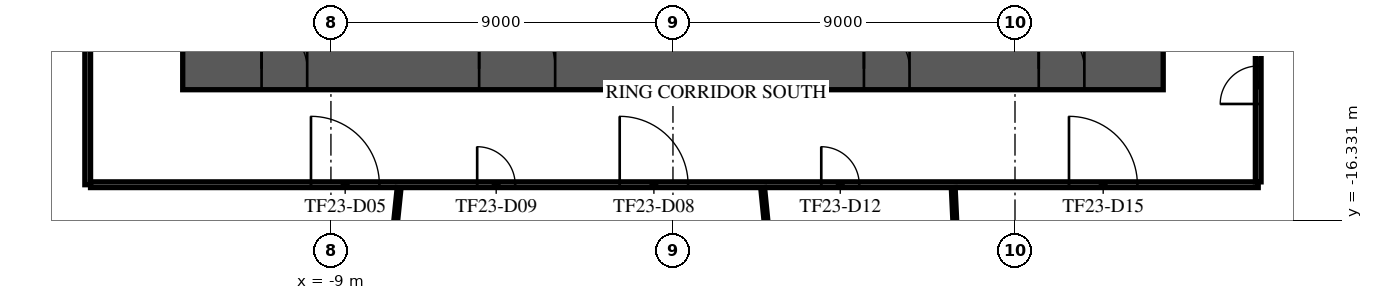
"""IFC4 building model, lengths in metres.
Left out: names, types, materials, properties, quantities, classifications, styles, units other than length and angle.
Written with IfcOpenShell. Run it as: python <this file> out.ifc"""

import sys

from ifc_helpers import new_model, si_unit, direction, frame, frame_2d, origin, place, context, subcontext, project, spatial, rectangle, extrude, element, fill, save


model = new_model("IFC4")
c1 = context("Model", 3, precision=1e-05, world=origin(), true_north=direction((0.0, 1.0)))
c2 = subcontext(c1, "Body", "Model", "MODEL_VIEW")
j1 = project(units=[si_unit("LENGTHUNIT", "METRE"), si_unit("PLANEANGLEUNIT", "RADIAN")], contexts=[c1])
p1 = place(None, origin())
s1 = spatial("IfcSite", under=j1, at=p1, CompositionType="ELEMENT")
p2 = place(p1, origin())
s2 = spatial("IfcBuilding", under=s1, at=p2, CompositionType="ELEMENT")
p3 = place(p2, frame((0.0, 0.0, 102.1)))
s3 = spatial("IfcBuildingStorey", under=s2, at=p3, CompositionType="ELEMENT", Elevation=102.1)
p4 = place(p3, frame((-12.9, -12.35, 0.0), z_axis=(0.0, 0.0, 1.0), x_axis=(1.0, 0.0, 0.0)))
e1 = element("IfcWall", 1, at=p4, inside=s3, PredefinedType="SHEAR", context=c2, shape_type="SweptSolid", body=[
    extrude(rectangle(XDim=25.8, YDim=1.1, at=frame_2d((12.9, 0.0))), origin(), (0.0, 0.0, 1.0), 3.58),
])
p5 = place(p4, frame((7.8, 0.0, 0.0)))
e2 = element("IfcOpeningElement", 2, at=p5, cuts=e1, PredefinedType="OPENING", context=c2, shape_type="SweptSolid", body=[
    extrude(rectangle(XDim=2.0, YDim=2.1, at=frame_2d((1.0, 1.05))), frame((0.0, 0.56, 0.0), z_axis=(0.0, -1.0, 0.0), x_axis=(1.0, 0.0, 0.0)), (0.0, 0.0, 1.0), 1.12),
])
p6 = place(p4, frame((17.925, 0.0, 0.0)))
e3 = element("IfcOpeningElement", 3, at=p6, cuts=e1, PredefinedType="OPENING", context=c2, shape_type="SweptSolid", body=[
    extrude(rectangle(XDim=1.2, YDim=2.1, at=frame_2d((0.6, 1.05))), frame((0.0, 0.56, 0.0), z_axis=(0.0, -1.0, 0.0), x_axis=(1.0, 0.0, 0.0)), (0.0, 0.0, 1.0), 1.12),
])
p7 = place(p4, frame((2.075, 0.0, 0.0)))
e4 = element("IfcOpeningElement", 4, at=p7, cuts=e1, PredefinedType="OPENING", context=c2, shape_type="SweptSolid", body=[
    extrude(rectangle(XDim=1.2, YDim=2.1, at=frame_2d((0.6, 1.05))), frame((0.0, 0.56, 0.0), z_axis=(0.0, -1.0, 0.0), x_axis=(1.0, 0.0, 0.0)), (0.0, 0.0, 1.0), 1.12),
])
p8 = place(p4, frame((22.525, 0.0, 0.0)))
e5 = element("IfcOpeningElement", 5, at=p8, cuts=e1, PredefinedType="OPENING", context=c2, shape_type="SweptSolid", body=[
    extrude(rectangle(XDim=1.2, YDim=2.1, at=frame_2d((0.6, 1.05))), frame((0.0, 0.56, 0.0), z_axis=(0.0, -1.0, 0.0), x_axis=(1.0, 0.0, 0.0)), (0.0, 0.0, 1.0), 1.12),
])
p9 = place(p3, frame((-15.4, -15.4, 0.0), z_axis=(0.0, 0.0, 1.0), x_axis=(0.0, 1.0, 0.0)))
e6 = element("IfcWall", 6, at=p9, inside=s3, PredefinedType="PARTITIONING", context=c2, shape_type="SweptSolid", body=[
    extrude(rectangle(XDim=30.8, YDim=0.15, at=frame_2d((15.4, 0.0))), origin(), (0.0, 0.0, 1.0), 3.08),
])
p10 = place(p9, frame((21.999, 0.0, 0.0)))
e7 = element("IfcOpeningElement", 7, at=p10, cuts=e6, PredefinedType="OPENING", context=c2, shape_type="SweptSolid", body=[
    extrude(rectangle(XDim=1.0, YDim=2.1, at=frame_2d((0.5, 1.05))), frame((0.0, 0.085, 0.0), z_axis=(0.0, -1.0, 0.0), x_axis=(1.0, 0.0, 0.0)), (0.0, 0.0, 1.0), 0.17),
])
p11 = place(p9, frame((11.518, 0.0, 0.0)))
e8 = element("IfcOpeningElement", 8, at=p11, cuts=e6, PredefinedType="OPENING", context=c2, shape_type="SweptSolid", body=[
    extrude(rectangle(XDim=1.0, YDim=2.1, at=frame_2d((0.5, 1.05))), frame((0.0, 0.085, 0.0), z_axis=(0.0, -1.0, 0.0), x_axis=(1.0, 0.0, 0.0)), (0.0, 0.0, 1.0), 0.17),
])
p12 = place(p9, frame((26.005, 0.0, 0.0)))
e9 = element("IfcOpeningElement", 9, at=p12, cuts=e6, PredefinedType="OPENING", context=c2, shape_type="SweptSolid", body=[
    extrude(rectangle(XDim=1.8, YDim=2.1, at=frame_2d((0.9, 1.05))), frame((0.0, 0.085, 0.0), z_axis=(0.0, -1.0, 0.0), x_axis=(1.0, 0.0, 0.0)), (0.0, 0.0, 1.0), 0.17),
])
p13 = place(p9, frame((6.3, 0.0, 0.0)))
e10 = element("IfcOpeningElement", 10, at=p13, cuts=e6, PredefinedType="OPENING", context=c2, shape_type="SweptSolid", body=[
    extrude(rectangle(XDim=1.0, YDim=2.1, at=frame_2d((0.5, 1.05))), frame((0.0, 0.085, 0.0), z_axis=(0.0, -1.0, 0.0), x_axis=(1.0, 0.0, 0.0)), (0.0, 0.0, 1.0), 0.17),
])
p14 = place(p3, frame((-15.325, -15.4, 0.0), z_axis=(0.0, 0.0, 1.0), x_axis=(1.0, 0.0, 0.0)))
e11 = element("IfcWall", 11, at=p14, inside=s3, PredefinedType="PARTITIONING", context=c2, shape_type="SweptSolid", body=[
    extrude(rectangle(XDim=30.725, YDim=0.15, at=frame_2d((15.362, 0.0))), origin(), (0.0, 0.0, 1.0), 3.08),
])
p15 = place(p14, frame((5.8, 0.0, 0.0)))
e12 = element("IfcOpeningElement", 12, at=p15, cuts=e11, PredefinedType="OPENING", context=c2, shape_type="SweptSolid", body=[
    extrude(rectangle(XDim=1.8, YDim=2.1, at=frame_2d((0.9, 1.05))), frame((0.0, 0.085, 0.0), z_axis=(0.0, -1.0, 0.0), x_axis=(1.0, 0.0, 0.0)), (0.0, 0.0, 1.0), 0.17),
])
p16 = place(p14, frame((13.923, 0.0, 0.0)))
e13 = element("IfcOpeningElement", 13, at=p16, cuts=e11, PredefinedType="OPENING", context=c2, shape_type="SweptSolid", body=[
    extrude(rectangle(XDim=1.8, YDim=2.1, at=frame_2d((0.9, 1.05))), frame((0.0, 0.085, 0.0), z_axis=(0.0, -1.0, 0.0), x_axis=(1.0, 0.0, 0.0)), (0.0, 0.0, 1.0), 0.17),
])
p17 = place(p14, frame((10.173, 0.0, 0.0)))
e14 = element("IfcOpeningElement", 14, at=p17, cuts=e11, PredefinedType="OPENING", context=c2, shape_type="SweptSolid", body=[
    extrude(rectangle(XDim=1.0, YDim=2.1, at=frame_2d((0.5, 1.05))), frame((0.0, 0.085, 0.0), z_axis=(0.0, -1.0, 0.0), x_axis=(1.0, 0.0, 0.0)), (0.0, 0.0, 1.0), 0.17),
])
p18 = place(p14, frame((19.227, 0.0, 0.0)))
e15 = element("IfcOpeningElement", 15, at=p18, cuts=e11, PredefinedType="OPENING", context=c2, shape_type="SweptSolid", body=[
    extrude(rectangle(XDim=1.0, YDim=2.1, at=frame_2d((0.5, 1.05))), frame((0.0, 0.085, 0.0), z_axis=(0.0, -1.0, 0.0), x_axis=(1.0, 0.0, 0.0)), (0.0, 0.0, 1.0), 0.17),
])
p19 = place(p14, frame((25.746, 0.0, 0.0)))
e16 = element("IfcOpeningElement", 16, at=p19, cuts=e11, PredefinedType="OPENING", context=c2, shape_type="SweptSolid", body=[
    extrude(rectangle(XDim=1.8, YDim=2.1, at=frame_2d((0.9, 1.05))), frame((0.0, 0.085, 0.0), z_axis=(0.0, -1.0, 0.0), x_axis=(1.0, 0.0, 0.0)), (0.0, 0.0, 1.0), 0.17),
])
p20 = place(p3, frame((15.4, -15.325, 0.0), z_axis=(0.0, 0.0, 1.0), x_axis=(0.0, 1.0, 0.0)))
e17 = element("IfcWall", 17, at=p20, inside=s3, PredefinedType="PARTITIONING", context=c2, shape_type="SweptSolid", body=[
    extrude(rectangle(XDim=30.65, YDim=0.15, at=frame_2d((15.325, 0.0))), origin(), (0.0, 0.0, 1.0), 3.08),
])
p21 = place(p20, frame((23.606, 0.0, 0.0)))
e18 = element("IfcOpeningElement", 18, at=p21, cuts=e17, PredefinedType="OPENING", context=c2, shape_type="SweptSolid", body=[
    extrude(rectangle(XDim=1.8, YDim=2.1, at=frame_2d((0.9, 1.05))), frame((0.0, 0.085, 0.0), z_axis=(0.0, -1.0, 0.0), x_axis=(1.0, 0.0, 0.0)), (0.0, 0.0, 1.0), 0.17),
])
p22 = place(p20, frame((2.05, 0.0, 0.0)))
e19 = element("IfcOpeningElement", 19, at=p22, cuts=e17, PredefinedType="OPENING", context=c2, shape_type="SweptSolid", body=[
    extrude(rectangle(XDim=1.0, YDim=2.1, at=frame_2d((0.5, 1.05))), frame((0.0, 0.085, 0.0), z_axis=(0.0, -1.0, 0.0), x_axis=(1.0, 0.0, 0.0)), (0.0, 0.0, 1.0), 0.17),
])
p23 = place(p20, frame((13.822, 0.0, 0.0)))
e20 = element("IfcOpeningElement", 20, at=p23, cuts=e17, PredefinedType="OPENING", context=c2, shape_type="SweptSolid", body=[
    extrude(rectangle(XDim=1.0, YDim=2.1, at=frame_2d((0.5, 1.05))), frame((0.0, 0.085, 0.0), z_axis=(0.0, -1.0, 0.0), x_axis=(1.0, 0.0, 0.0)), (0.0, 0.0, 1.0), 0.17),
])
p24 = place(p20, frame((7.306, 0.0, 0.0)))
e21 = element("IfcOpeningElement", 21, at=p24, cuts=e17, PredefinedType="OPENING", context=c2, shape_type="SweptSolid", body=[
    extrude(rectangle(XDim=1.0, YDim=2.1, at=frame_2d((0.5, 1.05))), frame((0.0, 0.085, 0.0), z_axis=(0.0, -1.0, 0.0), x_axis=(1.0, 0.0, 0.0)), (0.0, 0.0, 1.0), 0.17),
])
p25 = place(p3, frame((-8.993, -32.799, 0.0), z_axis=(0.0, 0.0, 1.0), x_axis=(0.102654687672, 0.994717052784, 0.0)))
e22 = element("IfcWall", 22, at=p25, inside=s3, PredefinedType="PARTITIONING", context=c2, shape_type="SweptSolid", body=[
    extrude(rectangle(XDim=17.411, YDim=0.1, at=frame_2d((8.706, 0.0))), origin(), (0.0, 0.0, 1.0), 2.83),
])
p26 = place(p3, frame((2.36, -15.48, 0.0), z_axis=(0.0, 0.0, 1.0), x_axis=(0.099470960922, -0.995040465475, 0.0)))
e23 = element("IfcWall", 23, at=p26, inside=s3, PredefinedType="PARTITIONING", context=c2, shape_type="SweptSolid", body=[
    extrude(rectangle(XDim=12.544, YDim=0.1, at=frame_2d((6.272, 0.0))), origin(), (0.0, 0.0, 1.0), 2.83),
])
p27 = place(p3, frame((7.375, -15.477, 0.0), z_axis=(0.0, 0.0, 1.0), x_axis=(0.046868466971, -0.998901069578, 0.0)))
e24 = element("IfcWall", 24, at=p27, inside=s3, PredefinedType="PARTITIONING", context=c2, shape_type="SweptSolid", body=[
    extrude(rectangle(XDim=10.856, YDim=0.1, at=frame_2d((5.428, 0.0))), origin(), (0.0, 0.0, 1.0), 2.83),
])
p28 = place(p5, origin())
e25 = element("IfcDoor", 25, at=p28, inside=s3, OperationType="SINGLE_SWING_LEFT", PredefinedType="DOOR", context=c2, shape_type="SweptSolid", body=[
    extrude(rectangle(XDim=2.0, YDim=2.1, at=frame_2d((1.0, 1.05))), frame((0.0, 0.025, 0.0), z_axis=(0.0, -1.0, 0.0), x_axis=(1.0, 0.0, 0.0)), (0.0, 0.0, 1.0), 0.05),
])
fill(e2, e25)
p29 = place(p6, origin())
e26 = element("IfcDoor", 26, at=p29, inside=s3, OperationType="SINGLE_SWING_LEFT", PredefinedType="DOOR", context=c2, shape_type="SweptSolid", body=[
    extrude(rectangle(XDim=1.2, YDim=2.1, at=frame_2d((0.6, 1.05))), frame((0.0, 0.025, 0.0), z_axis=(0.0, -1.0, 0.0), x_axis=(1.0, 0.0, 0.0)), (0.0, 0.0, 1.0), 0.05),
])
fill(e3, e26)
p30 = place(p7, origin())
e27 = element("IfcDoor", 27, at=p30, inside=s3, OperationType="SINGLE_SWING_LEFT", PredefinedType="DOOR", context=c2, shape_type="SweptSolid", body=[
    extrude(rectangle(XDim=1.2, YDim=2.1, at=frame_2d((0.6, 1.05))), frame((0.0, 0.025, 0.0), z_axis=(0.0, -1.0, 0.0), x_axis=(1.0, 0.0, 0.0)), (0.0, 0.0, 1.0), 0.05),
])
fill(e4, e27)
p31 = place(p8, origin())
e28 = element("IfcDoor", 28, at=p31, inside=s3, OperationType="SINGLE_SWING_LEFT", PredefinedType="DOOR", context=c2, shape_type="SweptSolid", body=[
    extrude(rectangle(XDim=1.2, YDim=2.1, at=frame_2d((0.6, 1.05))), frame((0.0, 0.025, 0.0), z_axis=(0.0, -1.0, 0.0), x_axis=(1.0, 0.0, 0.0)), (0.0, 0.0, 1.0), 0.05),
])
fill(e5, e28)
p32 = place(p15, frame((1.8, 0.0, 0.0), z_axis=(0.0, 0.0, 1.0), x_axis=(-1.0, 0.0, 0.0)))
e29 = element("IfcDoor", 29, at=p32, inside=s3, OperationType="DOUBLE_DOOR_SINGLE_SWING", PredefinedType="DOOR", context=c2, shape_type="SweptSolid", body=[
    extrude(rectangle(XDim=1.8, YDim=2.1, at=frame_2d((0.9, 1.05))), frame((0.0, 0.025, 0.0), z_axis=(0.0, -1.0, 0.0), x_axis=(1.0, 0.0, 0.0)), (0.0, 0.0, 1.0), 0.05),
])
fill(e12, e29)
p33 = place(p16, frame((1.8, 0.0, 0.0), z_axis=(0.0, 0.0, 1.0), x_axis=(-1.0, 0.0, 0.0)))
e30 = element("IfcDoor", 30, at=p33, inside=s3, OperationType="DOUBLE_DOOR_SINGLE_SWING", PredefinedType="DOOR", context=c2, shape_type="SweptSolid", body=[
    extrude(rectangle(XDim=1.8, YDim=2.1, at=frame_2d((0.9, 1.05))), frame((0.0, 0.025, 0.0), z_axis=(0.0, -1.0, 0.0), x_axis=(1.0, 0.0, 0.0)), (0.0, 0.0, 1.0), 0.05),
])
fill(e13, e30)
p34 = place(p17, frame((1.0, 0.0, 0.0), z_axis=(0.0, 0.0, 1.0), x_axis=(-1.0, 0.0, 0.0)))
e31 = element("IfcDoor", 31, at=p34, inside=s3, OperationType="SINGLE_SWING_RIGHT", PredefinedType="DOOR", context=c2, shape_type="SweptSolid", body=[
    extrude(rectangle(XDim=1.0, YDim=2.1, at=frame_2d((0.5, 1.05))), frame((0.0, 0.025, 0.0), z_axis=(0.0, -1.0, 0.0), x_axis=(1.0, 0.0, 0.0)), (0.0, 0.0, 1.0), 0.05),
])
fill(e14, e31)
p35 = place(p18, frame((1.0, 0.0, 0.0), z_axis=(0.0, 0.0, 1.0), x_axis=(-1.0, 0.0, 0.0)))
e32 = element("IfcDoor", 32, at=p35, inside=s3, OperationType="SINGLE_SWING_LEFT", PredefinedType="DOOR", context=c2, shape_type="SweptSolid", body=[
    extrude(rectangle(XDim=1.0, YDim=2.1, at=frame_2d((0.5, 1.05))), frame((0.0, 0.025, 0.0), z_axis=(0.0, -1.0, 0.0), x_axis=(1.0, 0.0, 0.0)), (0.0, 0.0, 1.0), 0.05),
])
fill(e15, e32)
p36 = place(p19, frame((1.8, 0.0, 0.0), z_axis=(0.0, 0.0, 1.0), x_axis=(-1.0, 0.0, 0.0)))
e33 = element("IfcDoor", 33, at=p36, inside=s3, OperationType="DOUBLE_DOOR_SINGLE_SWING", PredefinedType="DOOR", context=c2, shape_type="SweptSolid", body=[
    extrude(rectangle(XDim=1.8, YDim=2.1, at=frame_2d((0.9, 1.05))), frame((0.0, 0.025, 0.0), z_axis=(0.0, -1.0, 0.0), x_axis=(1.0, 0.0, 0.0)), (0.0, 0.0, 1.0), 0.05),
])
fill(e16, e33)
p37 = place(p22, frame((1.0, 0.0, 0.0), z_axis=(0.0, 0.0, 1.0), x_axis=(-1.0, 0.0, 0.0)))
e34 = element("IfcDoor", 34, at=p37, inside=s3, OperationType="SINGLE_SWING_RIGHT", PredefinedType="DOOR", context=c2, shape_type="SweptSolid", body=[
    extrude(rectangle(XDim=1.0, YDim=2.1, at=frame_2d((0.5, 1.05))), frame((0.0, 0.025, 0.0), z_axis=(0.0, -1.0, 0.0), x_axis=(1.0, 0.0, 0.0)), (0.0, 0.0, 1.0), 0.05),
])
fill(e19, e34)
save(model, sys.argv[1])
